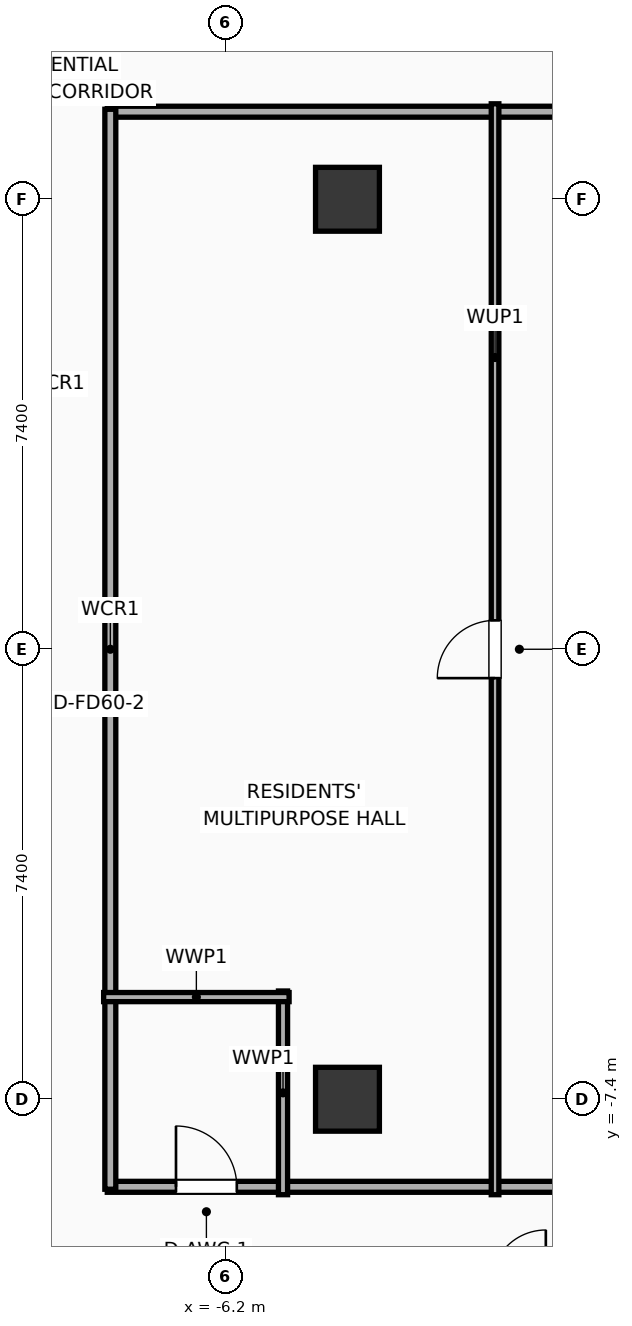
"""IFC4 building model, lengths in metres.
Left out: names, types, materials, properties, quantities, classifications, styles, units other than length and angle.
Written with IfcOpenShell. Run it as: python <this file> out.ifc"""

import sys

from ifc_helpers import new_model, si_unit, direction, frame, frame_2d, origin, origin_2d, place, context, subcontext, project, spatial, rectangle, extrude, element, fill, save


model = new_model("IFC4")
c1 = context("Model", 3, precision=1e-05, world=origin(), true_north=direction((0.0, 1.0)))
c2 = subcontext(c1, "Body", "Model", "MODEL_VIEW")
j1 = project(units=[si_unit("LENGTHUNIT", "METRE"), si_unit("PLANEANGLEUNIT", "RADIAN")], contexts=[c1])
p1 = place(None, origin())
s1 = spatial("IfcSite", under=j1, at=p1, CompositionType="ELEMENT")
p2 = place(p1, origin())
s2 = spatial("IfcBuilding", under=s1, at=p2, CompositionType="ELEMENT")
p3 = place(p2, frame((0.0, 0.0, 72.8)))
s3 = spatial("IfcBuildingStorey", under=s2, at=p3, CompositionType="ELEMENT", Elevation=72.8)
for number, where, z_axis, x_axis in (
    (1, (-4.2, -7.4, 0.0), (0.0, 0.0, 1.0), (1.0, 0.0, 0.0)),
    (2, (-4.2, 7.4, 0.0), (0.0, 0.0, 1.0), (1.0, 0.0, 0.0)),
):
    element("IfcColumn", number, at=place(p3, frame(where, z_axis=z_axis, x_axis=x_axis)), inside=s3, PredefinedType="COLUMN", context=c2, shape_type="SweptSolid", body=[
        extrude(rectangle(XDim=1.05, YDim=1.05, at=origin_2d()), origin(), (0.0, 0.0, 1.0), 3.9),
    ])
p4 = place(p3, frame((-8.15, 8.84, 0.0), z_axis=(0.0, 0.0, 1.0), x_axis=(1.0, 0.0, 0.0)))
e3 = element("IfcWall", 3, at=p4, inside=s3, PredefinedType="PARTITIONING", context=c2, shape_type="SweptSolid", body=[
    extrude(rectangle(XDim=16.3, YDim=0.18, at=frame_2d((8.15, 0.0))), origin(), (0.0, 0.0, 1.0), 3.65),
])
p5 = place(p4, frame((8.49, 0.0, 0.0)))
e4 = element("IfcOpeningElement", 4, at=p5, cuts=e3, PredefinedType="OPENING", context=c2, shape_type="SweptSolid", body=[
    extrude(rectangle(XDim=0.95, YDim=2.05, at=frame_2d((0.475, 1.025))), frame((0.0, 0.1, 0.0), z_axis=(0.0, -1.0, 0.0), x_axis=(1.0, 0.0, 0.0)), (0.0, 0.0, 1.0), 0.2),
])
p6 = place(p3, frame((-8.15, -8.84, 0.0), z_axis=(0.0, 0.0, 1.0), x_axis=(1.0, 0.0, 0.0)))
e5 = element("IfcWall", 5, at=p6, inside=s3, PredefinedType="PARTITIONING", context=c2, shape_type="SweptSolid", body=[
    extrude(rectangle(XDim=16.3, YDim=0.18, at=frame_2d((8.15, 0.0))), origin(), (0.0, 0.0, 1.0), 3.65),
])
p7 = place(p6, frame((1.13, 0.0, 0.0)))
e6 = element("IfcOpeningElement", 6, at=p7, cuts=e5, PredefinedType="OPENING", context=c2, shape_type="SweptSolid", body=[
    extrude(rectangle(XDim=1.0, YDim=2.05, at=frame_2d((0.5, 1.025))), frame((0.0, 0.1, 0.0), z_axis=(0.0, -1.0, 0.0), x_axis=(1.0, 0.0, 0.0)), (0.0, 0.0, 1.0), 0.2),
])
p8 = place(p6, frame((10.12, 0.0, 0.0)))
e7 = element("IfcOpeningElement", 7, at=p8, cuts=e5, PredefinedType="OPENING", context=c2, shape_type="SweptSolid", body=[
    extrude(rectangle(XDim=0.95, YDim=2.05, at=frame_2d((0.475, 1.025))), frame((0.0, 0.1, 0.0), z_axis=(0.0, -1.0, 0.0), x_axis=(1.0, 0.0, 0.0)), (0.0, 0.0, 1.0), 0.2),
])
p9 = place(p3, frame((-8.1, -8.88, 0.0), z_axis=(0.0, 0.0, 1.0), x_axis=(0.0, 1.0, 0.0)))
e8 = element("IfcWall", 8, at=p9, inside=s3, PredefinedType="PARTITIONING", context=c2, shape_type="SweptSolid", body=[
    extrude(rectangle(XDim=17.76, YDim=0.18, at=frame_2d((8.88, 0.0))), origin(), (0.0, 0.0, 1.0), 3.65),
])
p10 = place(p3, frame((-5.26, -8.97, 0.0), z_axis=(0.0, 0.0, 1.0), x_axis=(0.0, 1.0, 0.0)))
e9 = element("IfcWall", 9, at=p10, inside=s3, PredefinedType="PLUMBINGWALL", context=c2, shape_type="SweptSolid", body=[
    extrude(rectangle(XDim=3.35, YDim=0.15, at=frame_2d((1.675, 0.0))), origin(), (0.0, 0.0, 1.0), 3.65),
])
p11 = place(p3, frame((-8.21, -5.72, 0.0), z_axis=(0.0, 0.0, 1.0), x_axis=(1.0, 0.0, 0.0)))
e10 = element("IfcWall", 10, at=p11, inside=s3, PredefinedType="PLUMBINGWALL", context=c2, shape_type="SweptSolid", body=[
    extrude(rectangle(XDim=3.05, YDim=0.15, at=frame_2d((1.525, 0.0))), origin(), (0.0, 0.0, 1.0), 3.65),
])
p12 = place(p3, frame((-1.773, -8.97, 0.0), z_axis=(0.0, 0.0, 1.0), x_axis=(0.0, 1.0, 0.0)))
e11 = element("IfcWall", 11, at=p12, inside=s3, PredefinedType="PARTITIONING", context=c2, shape_type="SweptSolid", body=[
    extrude(rectangle(XDim=17.94, YDim=0.125, at=frame_2d((8.97, 0.0))), origin(), (0.0, 0.0, 1.0), 3.65),
])
p13 = place(p12, frame((8.495, 0.0, 0.0)))
e12 = element("IfcOpeningElement", 12, at=p13, cuts=e11, PredefinedType="OPENING", context=c2, shape_type="SweptSolid", body=[
    extrude(rectangle(XDim=0.95, YDim=2.05, at=frame_2d((0.475, 1.025))), frame((0.0, 0.073, 0.0), z_axis=(0.0, -1.0, 0.0), x_axis=(1.0, 0.0, 0.0)), (0.0, 0.0, 1.0), 0.145),
])
p14 = place(p7, origin())
e13 = element("IfcDoor", 13, at=p14, inside=s3, OperationType="SINGLE_SWING_LEFT", PredefinedType="DOOR", context=c2, shape_type="SweptSolid", body=[
    extrude(rectangle(XDim=1.0, YDim=2.05, at=frame_2d((0.5, 1.025))), frame((0.0, 0.025, 0.0), z_axis=(0.0, -1.0, 0.0), x_axis=(1.0, 0.0, 0.0)), (0.0, 0.0, 1.0), 0.05),
])
fill(e6, e13)
p15 = place(p13, origin())
e14 = element("IfcDoor", 14, at=p15, inside=s3, OperationType="SINGLE_SWING_LEFT", PredefinedType="DOOR", context=c2, shape_type="SweptSolid", body=[
    extrude(rectangle(XDim=0.95, YDim=2.05, at=frame_2d((0.475, 1.025))), frame((0.0, 0.025, 0.0), z_axis=(0.0, -1.0, 0.0), x_axis=(1.0, 0.0, 0.0)), (0.0, 0.0, 1.0), 0.05),
])
fill(e12, e14)
save(model, sys.argv[1])
